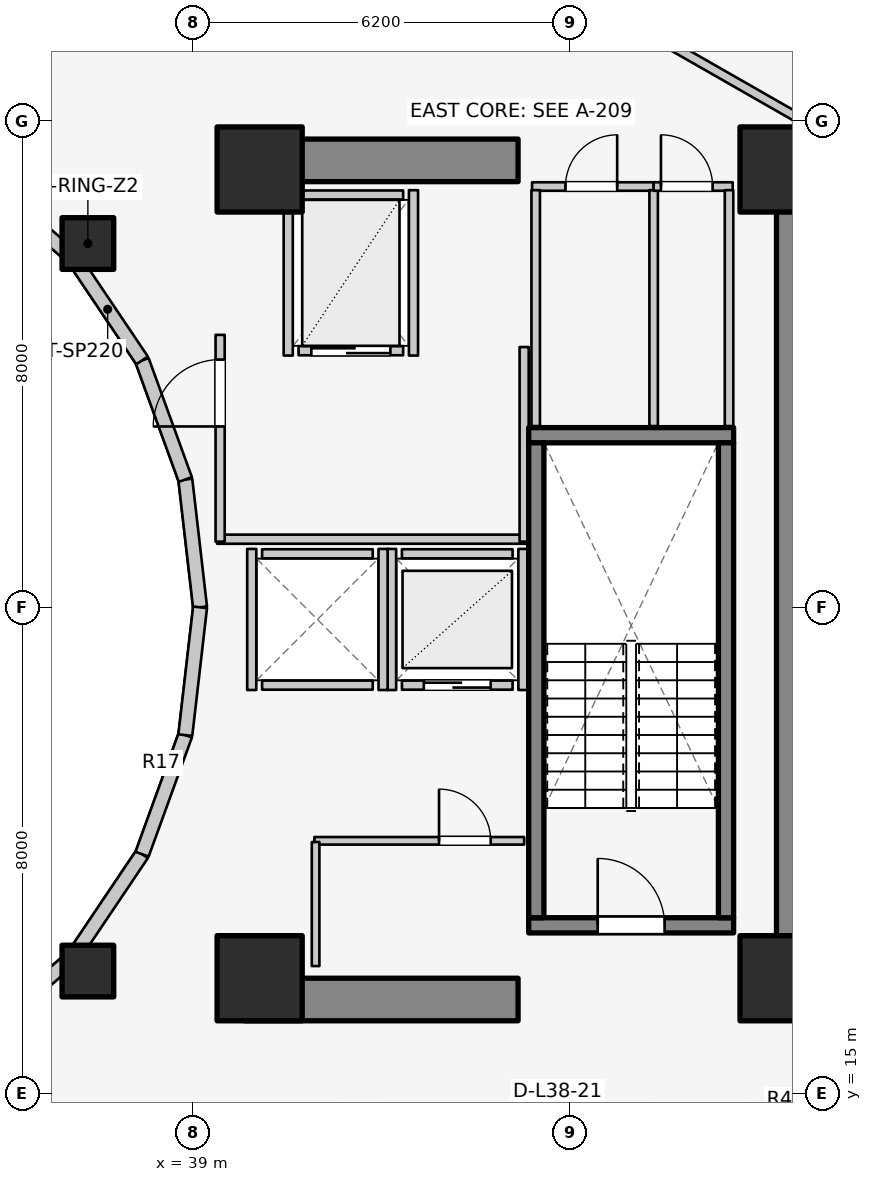
"""IFC4 building model, lengths in metres.
Left out: names, types, materials, properties, quantities, classifications, styles, units other than length and angle.
Written with IfcOpenShell. Run it as: python <this file> out.ifc"""

import sys

from ifc_helpers import new_model, si_unit, direction, frame, frame_2d, origin, origin_2d, place, context, subcontext, project, spatial, rectangle, extrude, element, fill, save


model = new_model("IFC4")
c1 = context("Model", 3, precision=1e-05, world=origin(), true_north=direction((0.0, 1.0)))
c2 = subcontext(c1, "Body", "Model", "MODEL_VIEW")
j1 = project(units=[si_unit("LENGTHUNIT", "METRE"), si_unit("PLANEANGLEUNIT", "RADIAN")], contexts=[c1])
p1 = place(None, origin())
s1 = spatial("IfcSite", under=j1, at=p1, CompositionType="ELEMENT")
p2 = place(p1, origin())
s2 = spatial("IfcBuilding", under=s1, at=p2, CompositionType="ELEMENT")
p3 = place(p2, frame((0.0, 0.0, 125.9)))
s3 = spatial("IfcBuildingStorey", under=s2, at=p3, CompositionType="ELEMENT", Elevation=125.9)
p4 = place(p3, frame((48.95, 17.05, 0.0), z_axis=(0.0, 0.0, 1.0), x_axis=(0.0, 1.0, 0.0)))
e1 = element("IfcWall", 1, at=p4, inside=s3, PredefinedType="SHEAR", context=c2, shape_type="SweptSolid", body=[
    extrude(rectangle(XDim=12.8, YDim=0.7, at=frame_2d((6.4, 0.0))), origin(), (0.0, 0.0, 1.0), 3.1),
])
for number, where, z_axis, x_axis in (
    (2, (39.85, 16.55, 0.0), (0.0, 0.0, 1.0), (1.0, 0.0, 0.0)),
    (3, (39.85, 30.35, 0.0), (0.0, 0.0, 1.0), (1.0, 0.0, 0.0)),
):
    element("IfcWall", number, at=place(p3, frame(where, z_axis=z_axis, x_axis=x_axis)), inside=s3, PredefinedType="SHEAR", context=c2, shape_type="SweptSolid", body=[
        extrude(rectangle(XDim=4.5, YDim=0.7, at=frame_2d((2.25, 0.0))), origin(), (0.0, 0.0, 1.0), 3.1),
    ])
p5 = place(p3, frame((44.525, 17.77, 0.0), z_axis=(0.0, 0.0, 1.0), x_axis=(1.0, 0.0, 0.0)))
e4 = element("IfcWall", 4, at=p5, inside=s3, PredefinedType="SOLIDWALL", context=c2, shape_type="SweptSolid", body=[
    extrude(rectangle(XDim=3.37, YDim=0.25, at=frame_2d((1.685, 0.0))), origin(), (0.0, 0.0, 1.0), 3.1),
])
p6 = place(p5, frame((1.135, 0.0, 0.0)))
e5 = element("IfcOpeningElement", 5, at=p6, cuts=e4, PredefinedType="OPENING", context=c2, shape_type="SweptSolid", body=[
    extrude(rectangle(XDim=1.1, YDim=2.1, at=frame_2d((0.55, 1.05))), frame((0.0, 0.135, 0.0), z_axis=(0.0, -1.0, 0.0), x_axis=(1.0, 0.0, 0.0)), (0.0, 0.0, 1.0), 0.27),
])
p7 = place(p3, frame((44.525, 25.83, 0.0), z_axis=(0.0, 0.0, 1.0), x_axis=(1.0, 0.0, 0.0)))
e6 = element("IfcWall", 6, at=p7, inside=s3, PredefinedType="SOLIDWALL", context=c2, shape_type="SweptSolid", body=[
    extrude(rectangle(XDim=3.37, YDim=0.25, at=frame_2d((1.685, 0.0))), origin(), (0.0, 0.0, 1.0), 3.1),
])
for number, where, z_axis, x_axis in (
    (7, (44.65, 17.895, 0.0), (0.0, 0.0, 1.0), (0.0, 1.0, 0.0)),
    (8, (47.77, 17.895, 0.0), (0.0, 0.0, 1.0), (0.0, 1.0, 0.0)),
):
    element("IfcWall", number, at=place(p3, frame(where, z_axis=z_axis, x_axis=x_axis)), inside=s3, PredefinedType="SOLIDWALL", context=c2, shape_type="SweptSolid", body=[
        extrude(rectangle(XDim=7.81, YDim=0.25, at=frame_2d((3.905, 0.0))), origin(), (0.0, 0.0, 1.0), 3.1),
    ])
for number, where, z_axis, x_axis in (
    (9, (40.1, 16.9, 0.0), (0.0, 0.0, 1.0), (1.0, 0.0, 0.0)),
    (10, (48.7, 16.9, 0.0), (0.0, 0.0, 1.0), (1.0, 0.0, 0.0)),
    (11, (48.7, 30.2, 0.0), (0.0, 0.0, 1.0), (1.0, 0.0, 0.0)),
    (12, (40.1, 30.2, 0.0), (0.0, 0.0, 1.0), (1.0, 0.0, 0.0)),
):
    element("IfcColumn", number, at=place(p3, frame(where, z_axis=z_axis, x_axis=x_axis)), inside=s3, PredefinedType="COLUMN", context=c2, shape_type="SweptSolid", body=[
        extrude(rectangle(XDim=1.4, YDim=1.4, at=origin_2d()), origin(), (0.0, 0.0, 1.0), 3.1),
    ])
for number, where, z_axis, x_axis in (
    (13, (37.275, 28.982, 0.0), (0.0, 0.0, 1.0), (1.0, 0.0, 0.0)),
    (14, (37.275, 17.018, 0.0), (0.0, 0.0, 1.0), (1.0, 0.0, 0.0)),
):
    element("IfcColumn", number, at=place(p3, frame(where, z_axis=z_axis, x_axis=x_axis)), inside=s3, PredefinedType="COLUMN", context=c2, shape_type="SweptSolid", body=[
        extrude(rectangle(XDim=0.85, YDim=0.85, at=origin_2d()), origin(), (0.0, 0.0, 1.0), 3.1),
    ])
p8 = place(p3, frame((39.12, 23.0, 0.0), z_axis=(0.0, 0.0, 1.0), x_axis=(-0.114711713601, 0.993398823617, 0.0)))
e15 = element("IfcWall", 15, at=p8, inside=s3, PredefinedType="STANDARD", context=c2, shape_type="SweptSolid", body=[
    extrude(rectangle(XDim=2.115, YDim=0.23, at=frame_2d((1.058, 0.0))), origin(), (0.0, 0.0, 1.0), 2.56),
])
p9 = place(p3, frame((38.877, 25.102, 0.0), z_axis=(0.0, 0.0, 1.0), x_axis=(-0.341423187295, 0.93990968033, 0.0)))
e16 = element("IfcWall", 16, at=p9, inside=s3, PredefinedType="STANDARD", context=c2, shape_type="SweptSolid", body=[
    extrude(rectangle(XDim=2.084, YDim=0.23, at=frame_2d((1.042, 0.0))), origin(), (0.0, 0.0, 1.0), 2.56),
])
p10 = place(p3, frame((38.166, 27.06, 0.0), z_axis=(0.0, 0.0, 1.0), x_axis=(-0.558197800898, 0.829707909492, 0.0)))
e17 = element("IfcWall", 17, at=p10, inside=s3, PredefinedType="STANDARD", context=c2, shape_type="SweptSolid", body=[
    extrude(rectangle(XDim=2.027, YDim=0.23, at=frame_2d((1.013, 0.0))), origin(), (0.0, 0.0, 1.0), 1.22),
])
for number, where, z_axis, x_axis in (
    (18, (37.035, 28.742, 0.0), (0.0, 0.0, 1.0), (-0.753, 0.659, 0.0)),
    (19, (35.56, 15.968, 0.0), (0.0, 0.0, 1.0), (0.753, 0.659, 0.0)),
):
    element("IfcWall", number, at=place(p3, frame(where, z_axis=z_axis, x_axis=x_axis)), inside=s3, PredefinedType="STANDARD", context=c2, shape_type="SweptSolid", body=[
        extrude(rectangle(XDim=1.959, YDim=0.23, at=frame_2d((0.98, 0.0))), origin(), (0.0, 0.0, 1.0), 1.22),
    ])
p11 = place(p3, frame((37.035, 17.258, 0.0), z_axis=(0.0, 0.0, 1.0), x_axis=(0.558197800898, 0.829707909492, 0.0)))
e20 = element("IfcWall", 20, at=p11, inside=s3, PredefinedType="STANDARD", context=c2, shape_type="SweptSolid", body=[
    extrude(rectangle(XDim=2.027, YDim=0.23, at=frame_2d((1.013, 0.0))), origin(), (0.0, 0.0, 1.0), 1.22),
])
p12 = place(p3, frame((38.166, 18.94, 0.0), z_axis=(0.0, 0.0, 1.0), x_axis=(0.341423187295, 0.93990968033, 0.0)))
e21 = element("IfcWall", 21, at=p12, inside=s3, PredefinedType="STANDARD", context=c2, shape_type="SweptSolid", body=[
    extrude(rectangle(XDim=2.084, YDim=0.23, at=frame_2d((1.042, 0.0))), origin(), (0.0, 0.0, 1.0), 2.56),
])
p13 = place(p3, frame((38.877, 20.898, 0.0), z_axis=(0.0, 0.0, 1.0), x_axis=(0.114711713601, 0.993398823617, 0.0)))
e22 = element("IfcWall", 22, at=p13, inside=s3, PredefinedType="STANDARD", context=c2, shape_type="SweptSolid", body=[
    extrude(rectangle(XDim=2.115, YDim=0.23, at=frame_2d((1.058, 0.0))), origin(), (0.0, 0.0, 1.0), 2.56),
])
p14 = place(p3, frame((42.44, 21.72, 0.0), z_axis=(0.0, 0.0, 1.0), x_axis=(1.0, 0.0, 0.0)))
e23 = element("IfcWall", 23, at=p14, inside=s3, PredefinedType="SOLIDWALL", context=c2, shape_type="SweptSolid", body=[
    extrude(rectangle(XDim=1.82, YDim=0.15, at=frame_2d((0.91, 0.0))), origin(), (0.0, 0.0, 1.0), 2.575),
])
p15 = place(p14, frame((0.36, 0.0, 0.0)))
e24 = element("IfcOpeningElement", 24, at=p15, cuts=e23, PredefinedType="OPENING", context=c2, shape_type="SweptSolid", body=[
    extrude(rectangle(XDim=1.1, YDim=2.1, at=frame_2d((0.55, 1.05))), frame((0.0, 0.085, 0.0), z_axis=(0.0, -1.0, 0.0), x_axis=(1.0, 0.0, 0.0)), (0.0, 0.0, 1.0), 0.17),
])
p16 = place(p3, frame((42.44, 23.88, 0.0), z_axis=(0.0, 0.0, 1.0), x_axis=(1.0, 0.0, 0.0)))
e25 = element("IfcWall", 25, at=p16, inside=s3, PredefinedType="SOLIDWALL", context=c2, shape_type="SweptSolid", body=[
    extrude(rectangle(XDim=1.82, YDim=0.15, at=frame_2d((0.91, 0.0))), origin(), (0.0, 0.0, 1.0), 2.575),
])
for number, where, z_axis, x_axis in (
    (26, (42.27, 21.64, 0.0), (0.0, 0.0, 1.0), (0.0, 1.0, 0.0)),
    (27, (44.43, 21.64, 0.0), (0.0, 0.0, 1.0), (0.0, 1.0, 0.0)),
):
    element("IfcWall", number, at=place(p3, frame(where, z_axis=z_axis, x_axis=x_axis)), inside=s3, PredefinedType="SOLIDWALL", context=c2, shape_type="SweptSolid", body=[
        extrude(rectangle(XDim=2.32, YDim=0.15, at=frame_2d((1.16, 0.0))), origin(), (0.0, 0.0, 1.0), 2.575),
    ])
for number, where, z_axis, x_axis in (
    (28, (40.14, 21.72, 0.0), (0.0, 0.0, 1.0), (1.0, 0.0, 0.0)),
    (29, (40.14, 23.88, 0.0), (0.0, 0.0, 1.0), (1.0, 0.0, 0.0)),
):
    element("IfcWall", number, at=place(p3, frame(where, z_axis=z_axis, x_axis=x_axis)), inside=s3, PredefinedType="SOLIDWALL", context=c2, shape_type="SweptSolid", body=[
        extrude(rectangle(XDim=1.82, YDim=0.15, at=frame_2d((0.91, 0.0))), origin(), (0.0, 0.0, 1.0), 2.12),
    ])
p17 = place(p3, frame((39.97, 21.64, 0.0), z_axis=(0.0, 0.0, 1.0), x_axis=(0.0, 1.0, 0.0)))
e30 = element("IfcWall", 30, at=p17, inside=s3, PredefinedType="SOLIDWALL", context=c2, shape_type="SweptSolid", body=[
    extrude(rectangle(XDim=2.32, YDim=0.15, at=frame_2d((1.16, 0.0))), origin(), (0.0, 0.0, 1.0), 2.12),
])
p18 = place(p3, frame((42.13, 21.64, 0.0), z_axis=(0.0, 0.0, 1.0), x_axis=(0.0, 1.0, 0.0)))
e31 = element("IfcWall", 31, at=p18, inside=s3, PredefinedType="SOLIDWALL", context=c2, shape_type="SweptSolid", body=[
    extrude(rectangle(XDim=2.32, YDim=0.15, at=frame_2d((1.16, 0.0))), origin(), (0.0, 0.0, 1.0), 2.575),
])
p19 = place(p3, frame((40.74, 27.22, 0.0), z_axis=(0.0, 0.0, 1.0), x_axis=(1.0, 0.0, 0.0)))
e32 = element("IfcWall", 32, at=p19, inside=s3, PredefinedType="SOLIDWALL", context=c2, shape_type="SweptSolid", body=[
    extrude(rectangle(XDim=1.72, YDim=0.15, at=frame_2d((0.86, 0.0))), origin(), (0.0, 0.0, 1.0), 2.575),
])
p20 = place(p19, frame((0.21, 0.0, 0.0)))
e33 = element("IfcOpeningElement", 33, at=p20, cuts=e32, PredefinedType="OPENING", context=c2, shape_type="SweptSolid", body=[
    extrude(rectangle(XDim=1.3, YDim=2.1, at=frame_2d((0.65, 1.05))), frame((0.0, 0.085, 0.0), z_axis=(0.0, -1.0, 0.0), x_axis=(1.0, 0.0, 0.0)), (0.0, 0.0, 1.0), 0.17),
])
p21 = place(p3, frame((40.74, 29.78, 0.0), z_axis=(0.0, 0.0, 1.0), x_axis=(1.0, 0.0, 0.0)))
e34 = element("IfcWall", 34, at=p21, inside=s3, PredefinedType="SOLIDWALL", context=c2, shape_type="SweptSolid", body=[
    extrude(rectangle(XDim=1.72, YDim=0.15, at=frame_2d((0.86, 0.0))), origin(), (0.0, 0.0, 1.0), 2.575),
])
for number, where, z_axis, x_axis in (
    (35, (40.57, 27.14, 0.0), (0.0, 0.0, 1.0), (0.0, 1.0, 0.0)),
    (36, (42.63, 27.14, 0.0), (0.0, 0.0, 1.0), (0.0, 1.0, 0.0)),
):
    element("IfcWall", number, at=place(p3, frame(where, z_axis=z_axis, x_axis=x_axis)), inside=s3, PredefinedType="SOLIDWALL", context=c2, shape_type="SweptSolid", body=[
        extrude(rectangle(XDim=2.72, YDim=0.15, at=frame_2d((1.36, 0.0))), origin(), (0.0, 0.0, 1.0), 2.575),
    ])
p22 = place(p3, frame((39.4, 24.12, 0.0), z_axis=(0.0, 0.0, 1.0), x_axis=(1.0, 0.0, 0.0)))
e37 = element("IfcWall", 37, at=p22, inside=s3, PredefinedType="PARTITIONING", context=c2, shape_type="SweptSolid", body=[
    extrude(rectangle(XDim=5.08, YDim=0.15, at=frame_2d((2.54, 0.0))), origin(), (0.0, 0.0, 1.0), 2.12),
])
p23 = place(p3, frame((44.45, 24.08, 0.0), z_axis=(0.0, 0.0, 1.0), x_axis=(0.0, 1.0, 0.0)))
e38 = element("IfcWall", 38, at=p23, inside=s3, PredefinedType="PARTITIONING", context=c2, shape_type="SweptSolid", body=[
    extrude(rectangle(XDim=3.2, YDim=0.15, at=frame_2d((1.6, 0.0))), origin(), (0.0, 0.0, 1.0), 2.575),
])
p24 = place(p3, frame((39.45, 24.08, 0.0), z_axis=(0.0, 0.0, 1.0), x_axis=(0.0, 1.0, 0.0)))
e39 = element("IfcWall", 39, at=p24, inside=s3, PredefinedType="PARTITIONING", context=c2, shape_type="SweptSolid", body=[
    extrude(rectangle(XDim=3.4, YDim=0.15, at=frame_2d((1.7, 0.0))), origin(), (0.0, 0.0, 1.0), 2.575),
])
p25 = place(p24, frame((1.894, 0.0, 0.0)))
e40 = element("IfcOpeningElement", 40, at=p25, cuts=e39, PredefinedType="OPENING", context=c2, shape_type="SweptSolid", body=[
    extrude(rectangle(XDim=1.1, YDim=2.1, at=frame_2d((0.55, 1.05))), frame((0.0, 0.085, 0.0), z_axis=(0.0, -1.0, 0.0), x_axis=(1.0, 0.0, 0.0)), (0.0, 0.0, 1.0), 0.17),
])
p26 = place(p3, frame((41.0, 19.16, 0.0), z_axis=(0.0, 0.0, 1.0), x_axis=(1.0, 0.0, 0.0)))
e41 = element("IfcWall", 41, at=p26, inside=s3, PredefinedType="PARTITIONING", context=c2, shape_type="SweptSolid", body=[
    extrude(rectangle(XDim=3.45, YDim=0.125, at=frame_2d((1.725, 0.0))), origin(), (0.0, 0.0, 1.0), 2.12),
])
p27 = place(p26, frame((2.05, 0.0, 0.0)))
e42 = element("IfcOpeningElement", 42, at=p27, cuts=e41, PredefinedType="OPENING", context=c2, shape_type="SweptSolid", body=[
    extrude(rectangle(XDim=0.85, YDim=2.05, at=frame_2d((0.425, 1.025))), frame((0.0, 0.073, 0.0), z_axis=(0.0, -1.0, 0.0), x_axis=(1.0, 0.0, 0.0)), (0.0, 0.0, 1.0), 0.145),
])
p28 = place(p3, frame((41.02, 17.1, 0.0), z_axis=(0.0, 0.0, 1.0), x_axis=(0.0, 1.0, 0.0)))
e43 = element("IfcWall", 43, at=p28, inside=s3, PredefinedType="PARTITIONING", context=c2, shape_type="SweptSolid", body=[
    extrude(rectangle(XDim=2.04, YDim=0.125, at=frame_2d((1.02, 0.0))), origin(), (0.0, 0.0, 1.0), 2.575),
])
p29 = place(p3, frame((44.58, 29.92, 0.0), z_axis=(0.0, 0.0, 1.0), x_axis=(1.0, 0.0, 0.0)))
e44 = element("IfcWall", 44, at=p29, inside=s3, PredefinedType="PLUMBINGWALL", context=c2, shape_type="SweptSolid", body=[
    extrude(rectangle(XDim=2.0, YDim=0.14, at=frame_2d((1.0, 0.0))), origin(), (0.0, 0.0, 1.0), 2.575),
])
p30 = place(p29, frame((0.55, 0.0, 0.0)))
e45 = element("IfcOpeningElement", 45, at=p30, cuts=e44, PredefinedType="OPENING", context=c2, shape_type="SweptSolid", body=[
    extrude(rectangle(XDim=0.85, YDim=2.05, at=frame_2d((0.425, 1.025))), frame((0.0, 0.08, 0.0), z_axis=(0.0, -1.0, 0.0), x_axis=(1.0, 0.0, 0.0)), (0.0, 0.0, 1.0), 0.16),
])
for number, where, z_axis, x_axis in (
    (46, (44.64, 25.98, 0.0), (0.0, 0.0, 1.0), (0.0, 1.0, 0.0)),
    (47, (46.58, 25.98, 0.0), (0.0, 0.0, 1.0), (0.0, 1.0, 0.0)),
):
    element("IfcWall", number, at=place(p3, frame(where, z_axis=z_axis, x_axis=x_axis)), inside=s3, PredefinedType="PLUMBINGWALL", context=c2, shape_type="SweptSolid", body=[
        extrude(rectangle(XDim=3.88, YDim=0.14, at=frame_2d((1.94, 0.0))), origin(), (0.0, 0.0, 1.0), 2.575),
    ])
p31 = place(p3, frame((46.58, 29.92, 0.0), z_axis=(0.0, 0.0, 1.0), x_axis=(1.0, 0.0, 0.0)))
e48 = element("IfcWall", 48, at=p31, inside=s3, PredefinedType="PLUMBINGWALL", context=c2, shape_type="SweptSolid", body=[
    extrude(rectangle(XDim=1.3, YDim=0.14, at=frame_2d((0.65, 0.0))), origin(), (0.0, 0.0, 1.0), 2.575),
])
p32 = place(p31, frame((0.12, 0.0, 0.0)))
e49 = element("IfcOpeningElement", 49, at=p32, cuts=e48, PredefinedType="OPENING", context=c2, shape_type="SweptSolid", body=[
    extrude(rectangle(XDim=0.85, YDim=2.05, at=frame_2d((0.425, 1.025))), frame((0.0, 0.08, 0.0), z_axis=(0.0, -1.0, 0.0), x_axis=(1.0, 0.0, 0.0)), (0.0, 0.0, 1.0), 0.16),
])
p33 = place(p3, frame((47.82, 25.98, 0.0), z_axis=(0.0, 0.0, 1.0), x_axis=(0.0, 1.0, 0.0)))
e50 = element("IfcWall", 50, at=p33, inside=s3, PredefinedType="PLUMBINGWALL", context=c2, shape_type="SweptSolid", body=[
    extrude(rectangle(XDim=3.88, YDim=0.14, at=frame_2d((1.94, 0.0))), origin(), (0.0, 0.0, 1.0), 2.575),
])
p34 = place(p3, frame((46.757, 32.305, 0.0), z_axis=(0.0, 0.0, 1.0), x_axis=(0.867991349648, -0.496579315857, 0.0)))
e51 = element("IfcWall", 51, at=p34, inside=s3, PredefinedType="PARTITIONING", context=c2, shape_type="SweptSolid", body=[
    extrude(rectangle(XDim=2.567, YDim=0.15, at=frame_2d((1.283, 0.0))), origin(), (0.0, 0.0, 1.0), 1.22),
])
p35 = place(p3, frame((35.55, 15.985, 0.0), z_axis=(0.0, 0.0, 1.0), x_axis=(0.523587550846, -0.851971875474, 0.0)))
e52 = element("IfcWall", 52, at=p35, inside=s3, PredefinedType="PARTITIONING", context=c2, shape_type="SweptSolid", body=[
    extrude(rectangle(XDim=3.153, YDim=0.125, at=frame_2d((1.577, 0.0))), origin(), (0.0, 0.0, 1.0), 1.22),
])
p36 = place(p6, origin())
e53 = element("IfcDoor", 53, at=p36, inside=s3, OperationType="SINGLE_SWING_LEFT", PredefinedType="DOOR", context=c2, shape_type="SweptSolid", body=[
    extrude(rectangle(XDim=1.1, YDim=2.1, at=frame_2d((0.55, 1.05))), frame((0.0, 0.025, 0.0), z_axis=(0.0, -1.0, 0.0), x_axis=(1.0, 0.0, 0.0)), (0.0, 0.0, 1.0), 0.05),
])
fill(e5, e53)
p37 = place(p15, origin())
e54 = element("IfcDoor", 54, at=p37, inside=s3, OperationType="DOUBLE_DOOR_SLIDING", PredefinedType="DOOR", context=c2, shape_type="SweptSolid", body=[
    extrude(rectangle(XDim=1.1, YDim=2.1, at=frame_2d((0.55, 1.05))), frame((0.0, 0.025, 0.0), z_axis=(0.0, -1.0, 0.0), x_axis=(1.0, 0.0, 0.0)), (0.0, 0.0, 1.0), 0.05),
])
fill(e24, e54)
p38 = place(p20, origin())
e55 = element("IfcDoor", 55, at=p38, inside=s3, OperationType="DOUBLE_DOOR_SLIDING", PredefinedType="DOOR", context=c2, shape_type="SweptSolid", body=[
    extrude(rectangle(XDim=1.3, YDim=2.1, at=frame_2d((0.65, 1.05))), frame((0.0, 0.025, 0.0), z_axis=(0.0, -1.0, 0.0), x_axis=(1.0, 0.0, 0.0)), (0.0, 0.0, 1.0), 0.05),
])
fill(e33, e55)
p39 = place(p25, origin())
e56 = element("IfcDoor", 56, at=p39, inside=s3, OperationType="SINGLE_SWING_LEFT", PredefinedType="DOOR", context=c2, shape_type="SweptSolid", body=[
    extrude(rectangle(XDim=1.1, YDim=2.1, at=frame_2d((0.55, 1.05))), frame((0.0, 0.025, 0.0), z_axis=(0.0, -1.0, 0.0), x_axis=(1.0, 0.0, 0.0)), (0.0, 0.0, 1.0), 0.05),
])
fill(e40, e56)
p40 = place(p27, origin())
e57 = element("IfcDoor", 57, at=p40, inside=s3, OperationType="SINGLE_SWING_LEFT", PredefinedType="DOOR", context=c2, shape_type="SweptSolid", body=[
    extrude(rectangle(XDim=0.85, YDim=2.05, at=frame_2d((0.425, 1.025))), frame((0.0, 0.025, 0.0), z_axis=(0.0, -1.0, 0.0), x_axis=(1.0, 0.0, 0.0)), (0.0, 0.0, 1.0), 0.05),
])
fill(e42, e57)
p41 = place(p30, origin())
e58 = element("IfcDoor", 58, at=p41, inside=s3, OperationType="SINGLE_SWING_RIGHT", PredefinedType="DOOR", context=c2, shape_type="SweptSolid", body=[
    extrude(rectangle(XDim=0.85, YDim=2.05, at=frame_2d((0.425, 1.025))), frame((0.0, 0.025, 0.0), z_axis=(0.0, -1.0, 0.0), x_axis=(1.0, 0.0, 0.0)), (0.0, 0.0, 1.0), 0.05),
])
fill(e45, e58)
p42 = place(p32, origin())
e59 = element("IfcDoor", 59, at=p42, inside=s3, OperationType="SINGLE_SWING_LEFT", PredefinedType="DOOR", context=c2, shape_type="SweptSolid", body=[
    extrude(rectangle(XDim=0.85, YDim=2.05, at=frame_2d((0.425, 1.025))), frame((0.0, 0.025, 0.0), z_axis=(0.0, -1.0, 0.0), x_axis=(1.0, 0.0, 0.0)), (0.0, 0.0, 1.0), 0.05),
])
fill(e49, e59)
save(model, sys.argv[1])
